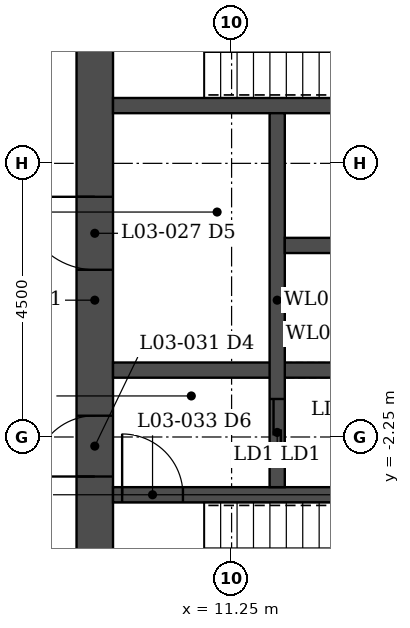
"""IFC4 building model, lengths in metres.
Left out: names, types, materials, properties, quantities, classifications, styles, units other than length and angle.
Written with IfcOpenShell. Run it as: python <this file> out.ifc"""

import sys

from ifc_helpers import new_model, si_unit, direction, frame, frame_2d, origin, place, context, subcontext, project, spatial, rectangle, extrude, element, fill, save


model = new_model("IFC4")
c1 = context("Model", 3, precision=1e-05, world=origin(), true_north=direction((0.0, 1.0)))
c2 = subcontext(c1, "Body", "Model", "MODEL_VIEW")
j1 = project(units=[si_unit("LENGTHUNIT", "METRE"), si_unit("PLANEANGLEUNIT", "RADIAN")], contexts=[c1])
p1 = place(None, origin())
s1 = spatial("IfcSite", under=j1, at=p1, CompositionType="ELEMENT")
p2 = place(p1, origin())
s2 = spatial("IfcBuilding", under=s1, at=p2, CompositionType="ELEMENT")
p3 = place(p2, frame((0.0, 0.0, 16.0)))
s3 = spatial("IfcBuildingStorey", under=s2, at=p3, CompositionType="ELEMENT", Elevation=16.0)
p4 = place(p3, frame((9.0, -6.45, 0.0), z_axis=(0.0, 0.0, 1.0), x_axis=(0.0, 1.0, 0.0)))
e1 = element("IfcWall", 1, at=p4, inside=s3, PredefinedType="SHEAR", context=c2, shape_type="SweptSolid", body=[
    extrude(rectangle(XDim=12.9, YDim=0.6, at=frame_2d((6.45, 0.0))), origin(), (0.0, 0.0, 1.0), 5.5),
])
p5 = place(p4, frame((3.55, 0.0, 0.0)))
e2 = element("IfcOpeningElement", 2, at=p5, cuts=e1, PredefinedType="OPENING", context=c2, shape_type="SweptSolid", body=[
    extrude(rectangle(XDim=1.0, YDim=2.1, at=frame_2d((0.5, 1.05))), frame((0.0, 0.31, 0.0), z_axis=(0.0, -1.0, 0.0), x_axis=(1.0, 0.0, 0.0)), (0.0, 0.0, 1.0), 0.62),
])
p6 = place(p4, frame((6.95, 0.0, 0.0)))
e3 = element("IfcOpeningElement", 3, at=p6, cuts=e1, PredefinedType="OPENING", context=c2, shape_type="SweptSolid", body=[
    extrude(rectangle(XDim=1.2, YDim=2.1, at=frame_2d((0.6, 1.05))), frame((0.0, 0.31, 0.0), z_axis=(0.0, -1.0, 0.0), x_axis=(1.0, 0.0, 0.0)), (0.0, 0.0, 1.0), 0.62),
])
p7 = place(p4, frame((10.85, 0.0, 0.0)))
e4 = element("IfcOpeningElement", 4, at=p7, cuts=e1, PredefinedType="OPENING", context=c2, shape_type="SweptSolid", body=[
    extrude(rectangle(XDim=1.0, YDim=2.1, at=frame_2d((0.5, 1.05))), frame((0.0, 0.31, 0.0), z_axis=(0.0, -1.0, 0.0), x_axis=(1.0, 0.0, 0.0)), (0.0, 0.0, 1.0), 0.62),
])
p8 = place(p3, frame((9.3, -3.2, 0.0), z_axis=(0.0, 0.0, 1.0), x_axis=(1.0, 0.0, 0.0)))
e5 = element("IfcWall", 5, at=p8, inside=s3, PredefinedType="SHEAR", context=c2, shape_type="SweptSolid", body=[
    extrude(rectangle(XDim=8.4, YDim=0.25, at=frame_2d((4.2, 0.0))), origin(), (0.0, 0.0, 1.0), 5.5),
])
p9 = place(p8, frame((0.15, 0.0, 0.0)))
e6 = element("IfcOpeningElement", 6, at=p9, cuts=e5, PredefinedType="OPENING", context=c2, shape_type="SweptSolid", body=[
    extrude(rectangle(XDim=1.0, YDim=2.1, at=frame_2d((0.5, 1.05))), frame((0.0, 0.135, 0.0), z_axis=(0.0, -1.0, 0.0), x_axis=(1.0, 0.0, 0.0)), (0.0, 0.0, 1.0), 0.27),
])
p10 = place(p3, frame((9.3, 3.2, 0.0), z_axis=(0.0, 0.0, 1.0), x_axis=(1.0, 0.0, 0.0)))
e7 = element("IfcWall", 7, at=p10, inside=s3, PredefinedType="SHEAR", context=c2, shape_type="SweptSolid", body=[
    extrude(rectangle(XDim=8.4, YDim=0.25, at=frame_2d((4.2, 0.0))), origin(), (0.0, 0.0, 1.0), 5.5),
])
p11 = place(p3, frame((9.3, -1.15, 0.0), z_axis=(0.0, 0.0, 1.0), x_axis=(1.0, 0.0, 0.0)))
e8 = element("IfcWall", 8, at=p11, inside=s3, PredefinedType="SHEAR", context=c2, shape_type="SweptSolid", body=[
    extrude(rectangle(XDim=5.375, YDim=0.25, at=frame_2d((2.688, 0.0))), origin(), (0.0, 0.0, 1.0), 5.5),
])
p12 = place(p3, frame((12.0, -3.075, 0.0), z_axis=(0.0, 0.0, 1.0), x_axis=(0.0, 1.0, 0.0)))
e9 = element("IfcWall", 9, at=p12, inside=s3, PredefinedType="SHEAR", context=c2, shape_type="SweptSolid", body=[
    extrude(rectangle(XDim=6.15, YDim=0.25, at=frame_2d((3.075, 0.0))), origin(), (0.0, 0.0, 1.0), 5.5),
])
p13 = place(p12, frame((0.35, 0.0, 0.0)))
e10 = element("IfcOpeningElement", 10, at=p13, cuts=e9, PredefinedType="OPENING", context=c2, shape_type="SweptSolid", body=[
    extrude(rectangle(XDim=1.1, YDim=2.1, at=frame_2d((0.55, 1.05))), frame((0.0, 0.135, 0.0), z_axis=(0.0, -1.0, 0.0), x_axis=(1.0, 0.0, 0.0)), (0.0, 0.0, 1.0), 0.27),
])
p14 = place(p3, frame((12.125, 0.9, 0.0), z_axis=(0.0, 0.0, 1.0), x_axis=(1.0, 0.0, 0.0)))
e11 = element("IfcWall", 11, at=p14, inside=s3, PredefinedType="SHEAR", context=c2, shape_type="SweptSolid", body=[
    extrude(rectangle(XDim=2.55, YDim=0.25, at=frame_2d((1.275, 0.0))), origin(), (0.0, 0.0, 1.0), 5.5),
])
p15 = place(p5, origin())
e12 = element("IfcDoor", 12, at=p15, inside=s3, OperationType="SINGLE_SWING_LEFT", PredefinedType="DOOR", context=c2, shape_type="SweptSolid", body=[
    extrude(rectangle(XDim=1.0, YDim=2.1, at=frame_2d((0.5, 1.05))), frame((0.0, 0.025, 0.0), z_axis=(0.0, -1.0, 0.0), x_axis=(1.0, 0.0, 0.0)), (0.0, 0.0, 1.0), 0.05),
])
fill(e2, e12)
p16 = place(p9, origin())
e13 = element("IfcDoor", 13, at=p16, inside=s3, OperationType="SINGLE_SWING_LEFT", PredefinedType="DOOR", context=c2, shape_type="SweptSolid", body=[
    extrude(rectangle(XDim=1.0, YDim=2.1, at=frame_2d((0.5, 1.05))), frame((0.0, 0.025, 0.0), z_axis=(0.0, -1.0, 0.0), x_axis=(1.0, 0.0, 0.0)), (0.0, 0.0, 1.0), 0.05),
])
fill(e6, e13)
p17 = place(p6, origin())
e14 = element("IfcDoor", 14, at=p17, inside=s3, OperationType="SINGLE_SWING_RIGHT", PredefinedType="DOOR", context=c2, shape_type="SweptSolid", body=[
    extrude(rectangle(XDim=1.2, YDim=2.1, at=frame_2d((0.6, 1.05))), frame((0.0, 0.025, 0.0), z_axis=(0.0, -1.0, 0.0), x_axis=(1.0, 0.0, 0.0)), (0.0, 0.0, 1.0), 0.05),
])
fill(e3, e14)
p18 = place(p13, origin())
e15 = element("IfcDoor", 15, at=p18, inside=s3, OperationType="DOUBLE_DOOR_SLIDING", PredefinedType="DOOR", context=c2, shape_type="SweptSolid", body=[
    extrude(rectangle(XDim=1.1, YDim=2.1, at=frame_2d((0.55, 1.05))), frame((0.0, 0.025, 0.0), z_axis=(0.0, -1.0, 0.0), x_axis=(1.0, 0.0, 0.0)), (0.0, 0.0, 1.0), 0.05),
])
fill(e10, e15)
save(model, sys.argv[1])
